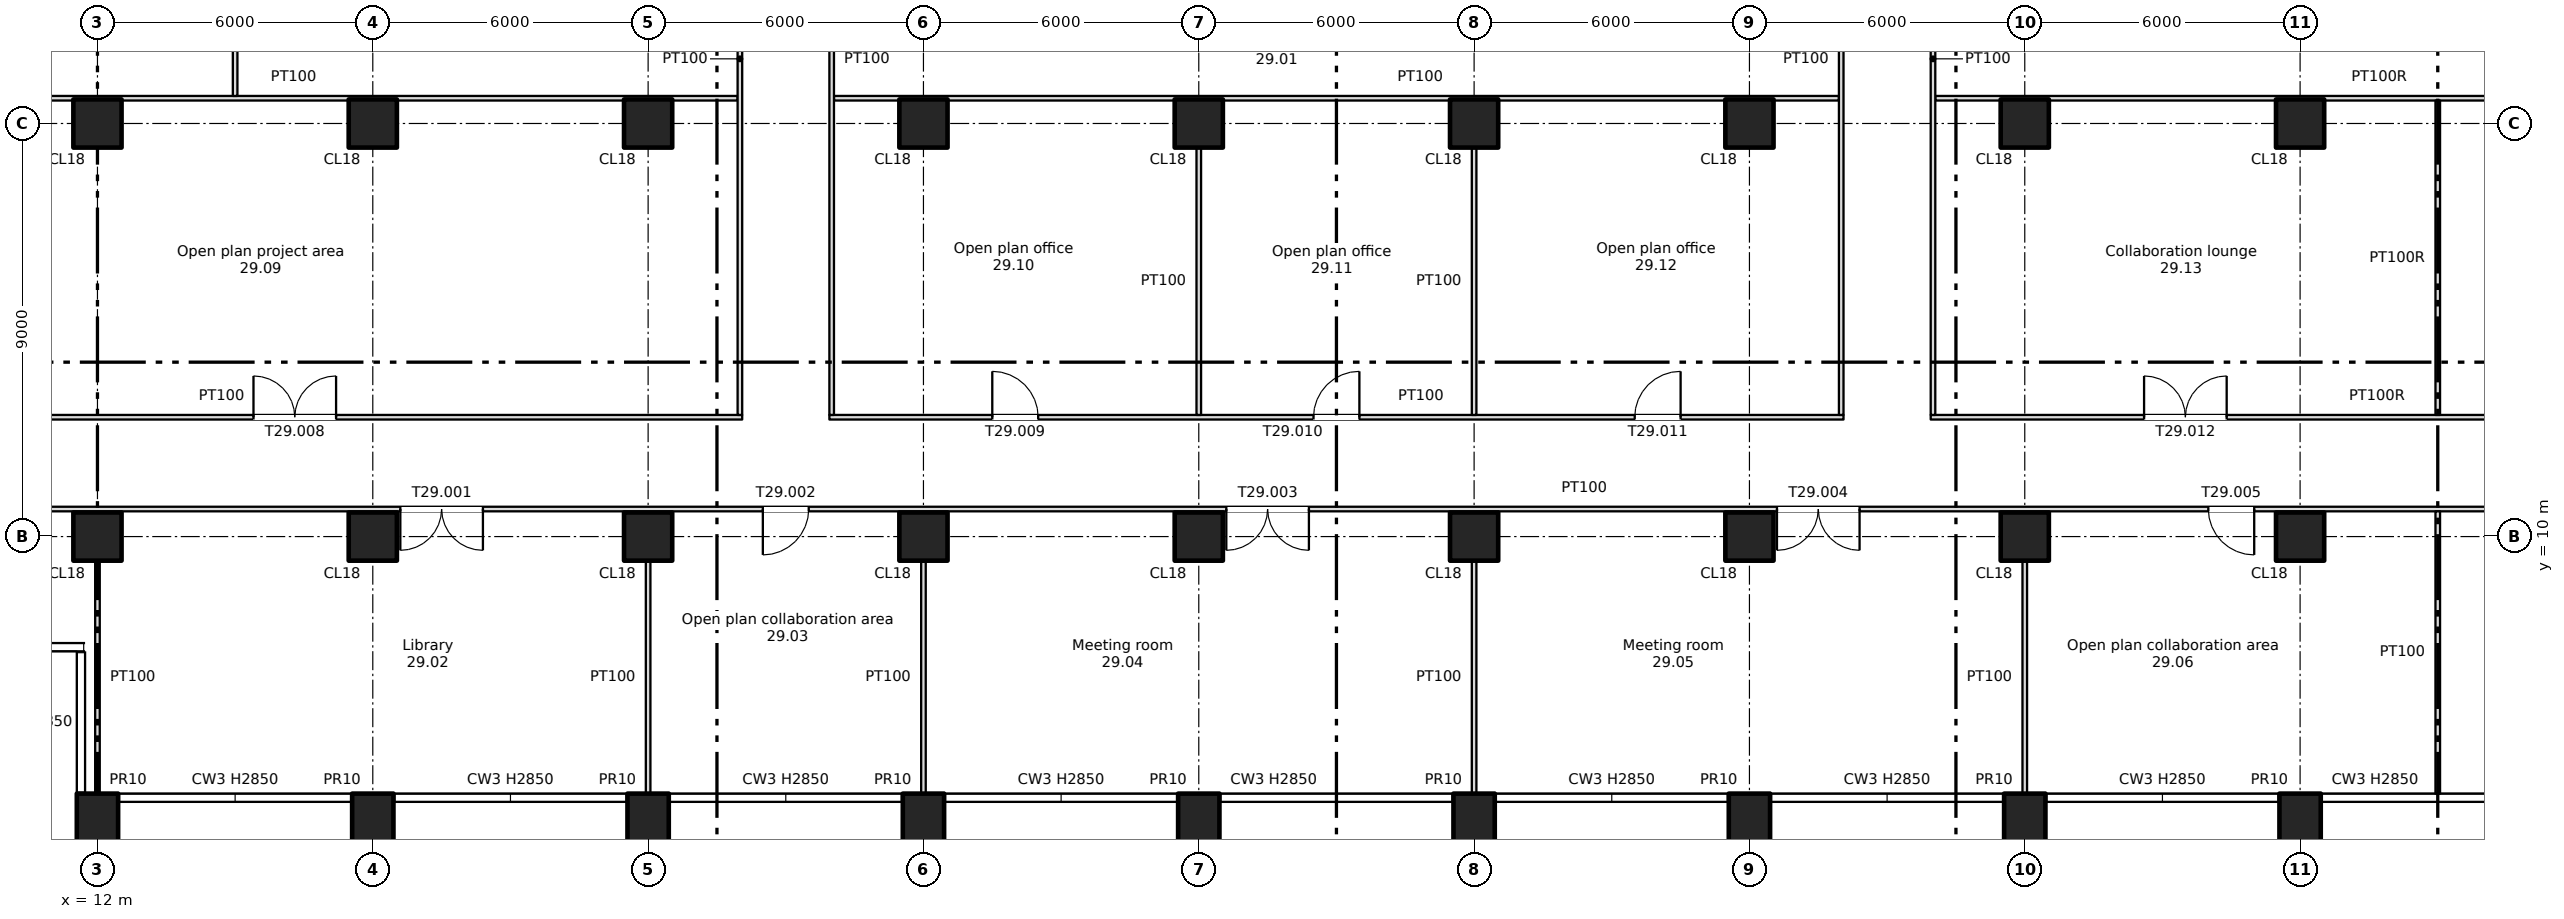
"""IFC4 building model, lengths in metres.
Left out: names, types, materials, properties, quantities, classifications, styles, units other than length and angle.
Written with IfcOpenShell. Run it as: python <this file> out.ifc"""

import sys

from ifc_helpers import new_model, si_unit, direction, frame, frame_2d, origin, origin_2d, place, context, subcontext, project, spatial, rectangle, extrude, element, fill, save


model = new_model("IFC4")
c1 = context("Model", 3, precision=1e-05, world=origin(), true_north=direction((0.0, 1.0)))
c2 = subcontext(c1, "Body", "Model", "MODEL_VIEW")
j1 = project(units=[si_unit("LENGTHUNIT", "METRE"), si_unit("PLANEANGLEUNIT", "RADIAN")], contexts=[c1])
p1 = place(None, origin())
s1 = spatial("IfcSite", under=j1, at=p1, CompositionType="ELEMENT")
p2 = place(p1, origin())
s2 = spatial("IfcBuilding", under=s1, at=p2, CompositionType="ELEMENT")
p3 = place(p2, frame((0.0, 0.0, 200.5)))
s3 = spatial("IfcBuildingStorey", under=s2, at=p3, CompositionType="ELEMENT", Elevation=200.5)
for number, where, z_axis, x_axis in (
    (1, (12.0, 3.7, -0.4), (0.0, 0.0, 1.0), (1.0, 0.0, 0.0)),
    (2, (18.0, 3.7, -0.4), (0.0, 0.0, 1.0), (1.0, 0.0, 0.0)),
    (3, (24.0, 3.7, -0.4), (0.0, 0.0, 1.0), (1.0, 0.0, 0.0)),
    (4, (30.0, 3.7, -0.4), (0.0, 0.0, 1.0), (1.0, 0.0, 0.0)),
    (5, (36.0, 3.7, -0.4), (0.0, 0.0, 1.0), (1.0, 0.0, 0.0)),
    (6, (42.0, 3.7, -0.4), (0.0, 0.0, 1.0), (1.0, 0.0, 0.0)),
    (7, (48.0, 3.7, -0.4), (0.0, 0.0, 1.0), (1.0, 0.0, 0.0)),
    (8, (54.0, 3.7, -0.4), (0.0, 0.0, 1.0), (1.0, 0.0, 0.0)),
    (9, (60.0, 3.7, -0.4), (0.0, 0.0, 1.0), (1.0, 0.0, 0.0)),
):
    element("IfcColumn", number, at=place(p3, frame(where, z_axis=z_axis, x_axis=x_axis)), inside=s3, PredefinedType="COLUMN", context=c2, shape_type="SweptSolid", body=[
        extrude(rectangle(XDim=0.9, YDim=1.4, at=origin_2d()), origin(), (0.0, 0.0, 1.0), 3.75),
    ])
for number, where, z_axis, x_axis in (
    (10, (12.0, 10.0, 0.0), (0.0, 0.0, 1.0), (1.0, 0.0, 0.0)),
    (11, (12.0, 19.0, 0.0), (0.0, 0.0, 1.0), (1.0, 0.0, 0.0)),
    (12, (18.0, 10.0, 0.0), (0.0, 0.0, 1.0), (1.0, 0.0, 0.0)),
    (13, (18.0, 19.0, 0.0), (0.0, 0.0, 1.0), (1.0, 0.0, 0.0)),
    (14, (24.0, 10.0, 0.0), (0.0, 0.0, 1.0), (1.0, 0.0, 0.0)),
    (15, (24.0, 19.0, 0.0), (0.0, 0.0, 1.0), (1.0, 0.0, 0.0)),
    (16, (30.0, 10.0, 0.0), (0.0, 0.0, 1.0), (1.0, 0.0, 0.0)),
    (17, (30.0, 19.0, 0.0), (0.0, 0.0, 1.0), (1.0, 0.0, 0.0)),
    (18, (36.0, 10.0, 0.0), (0.0, 0.0, 1.0), (1.0, 0.0, 0.0)),
    (19, (36.0, 19.0, 0.0), (0.0, 0.0, 1.0), (1.0, 0.0, 0.0)),
    (20, (42.0, 10.0, 0.0), (0.0, 0.0, 1.0), (1.0, 0.0, 0.0)),
    (21, (42.0, 19.0, 0.0), (0.0, 0.0, 1.0), (1.0, 0.0, 0.0)),
    (22, (48.0, 10.0, 0.0), (0.0, 0.0, 1.0), (1.0, 0.0, 0.0)),
    (23, (48.0, 19.0, 0.0), (0.0, 0.0, 1.0), (1.0, 0.0, 0.0)),
    (24, (54.0, 10.0, 0.0), (0.0, 0.0, 1.0), (1.0, 0.0, 0.0)),
    (25, (54.0, 19.0, 0.0), (0.0, 0.0, 1.0), (1.0, 0.0, 0.0)),
    (26, (60.0, 10.0, 0.0), (0.0, 0.0, 1.0), (1.0, 0.0, 0.0)),
    (27, (60.0, 19.0, 0.0), (0.0, 0.0, 1.0), (1.0, 0.0, 0.0)),
):
    element("IfcColumn", number, at=place(p3, frame(where, z_axis=z_axis, x_axis=x_axis)), inside=s3, PredefinedType="COLUMN", context=c2, shape_type="SweptSolid", body=[
        extrude(rectangle(XDim=1.05, YDim=1.05, at=origin_2d()), origin(), (0.0, 0.0, 1.0), 3.35),
    ])
p4 = place(p3, frame((6.6, 10.6, 0.0), z_axis=(0.0, 0.0, 1.0), x_axis=(1.0, 0.0, 0.0)))
e28 = element("IfcWall", 28, at=p4, inside=s3, PredefinedType="PARTITIONING", context=c2, shape_type="SweptSolid", body=[
    extrude(rectangle(XDim=64.8, YDim=0.1, at=frame_2d((32.4, 0.0))), origin(), (0.0, 0.0, 1.0), 3.35),
])
p5 = place(p4, frame((12.0, 0.0, 0.0)))
e29 = element("IfcOpeningElement", 29, at=p5, cuts=e28, PredefinedType="OPENING", context=c2, shape_type="SweptSolid", body=[
    extrude(rectangle(XDim=1.8, YDim=2.1, at=frame_2d((0.9, 1.05))), frame((0.0, 0.06, 0.0), z_axis=(0.0, -1.0, 0.0), x_axis=(1.0, 0.0, 0.0)), (0.0, 0.0, 1.0), 0.12),
])
p6 = place(p4, frame((19.9, 0.0, 0.0)))
e30 = element("IfcOpeningElement", 30, at=p6, cuts=e28, PredefinedType="OPENING", context=c2, shape_type="SweptSolid", body=[
    extrude(rectangle(XDim=1.0, YDim=2.1, at=frame_2d((0.5, 1.05))), frame((0.0, 0.06, 0.0), z_axis=(0.0, -1.0, 0.0), x_axis=(1.0, 0.0, 0.0)), (0.0, 0.0, 1.0), 0.12),
])
p7 = place(p4, frame((30.0, 0.0, 0.0)))
e31 = element("IfcOpeningElement", 31, at=p7, cuts=e28, PredefinedType="OPENING", context=c2, shape_type="SweptSolid", body=[
    extrude(rectangle(XDim=1.8, YDim=2.1, at=frame_2d((0.9, 1.05))), frame((0.0, 0.06, 0.0), z_axis=(0.0, -1.0, 0.0), x_axis=(1.0, 0.0, 0.0)), (0.0, 0.0, 1.0), 0.12),
])
p8 = place(p4, frame((42.0, 0.0, 0.0)))
e32 = element("IfcOpeningElement", 32, at=p8, cuts=e28, PredefinedType="OPENING", context=c2, shape_type="SweptSolid", body=[
    extrude(rectangle(XDim=1.8, YDim=2.1, at=frame_2d((0.9, 1.05))), frame((0.0, 0.06, 0.0), z_axis=(0.0, -1.0, 0.0), x_axis=(1.0, 0.0, 0.0)), (0.0, 0.0, 1.0), 0.12),
])
p9 = place(p4, frame((51.4, 0.0, 0.0)))
e33 = element("IfcOpeningElement", 33, at=p9, cuts=e28, PredefinedType="OPENING", context=c2, shape_type="SweptSolid", body=[
    extrude(rectangle(XDim=1.0, YDim=2.1, at=frame_2d((0.5, 1.05))), frame((0.0, 0.06, 0.0), z_axis=(0.0, -1.0, 0.0), x_axis=(1.0, 0.0, 0.0)), (0.0, 0.0, 1.0), 0.12),
])
p10 = place(p4, frame((60.1, 0.0, 0.0)))
e34 = element("IfcOpeningElement", 34, at=p10, cuts=e28, PredefinedType="OPENING", context=c2, shape_type="SweptSolid", body=[
    extrude(rectangle(XDim=1.0, YDim=2.1, at=frame_2d((0.5, 1.05))), frame((0.0, 0.06, 0.0), z_axis=(0.0, -1.0, 0.0), x_axis=(1.0, 0.0, 0.0)), (0.0, 0.0, 1.0), 0.12),
])
p11 = place(p4, frame((2.2, 0.0, 0.0)))
e35 = element("IfcOpeningElement", 35, at=p11, cuts=e28, PredefinedType="OPENING", context=c2, shape_type="SweptSolid", body=[
    extrude(rectangle(XDim=1.0, YDim=2.1, at=frame_2d((0.5, 1.05))), frame((0.0, 0.06, 0.0), z_axis=(0.0, -1.0, 0.0), x_axis=(1.0, 0.0, 0.0)), (0.0, 0.0, 1.0), 0.12),
])
p12 = place(p3, frame((6.6, 12.6, 0.0), z_axis=(0.0, 0.0, 1.0), x_axis=(1.0, 0.0, 0.0)))
e36 = element("IfcWall", 36, at=p12, inside=s3, PredefinedType="PARTITIONING", context=c2, shape_type="SweptSolid", body=[
    extrude(rectangle(XDim=19.45, YDim=0.1, at=frame_2d((9.725, 0.0))), origin(), (0.0, 0.0, 1.0), 3.35),
])
p13 = place(p12, frame((8.8, 0.0, 0.0)))
e37 = element("IfcOpeningElement", 37, at=p13, cuts=e36, PredefinedType="OPENING", context=c2, shape_type="SweptSolid", body=[
    extrude(rectangle(XDim=1.8, YDim=2.1, at=frame_2d((0.9, 1.05))), frame((0.0, 0.06, 0.0), z_axis=(0.0, -1.0, 0.0), x_axis=(1.0, 0.0, 0.0)), (0.0, 0.0, 1.0), 0.12),
])
p14 = place(p3, frame((27.95, 12.6, 0.0), z_axis=(0.0, 0.0, 1.0), x_axis=(1.0, 0.0, 0.0)))
e38 = element("IfcWall", 38, at=p14, inside=s3, PredefinedType="PARTITIONING", context=c2, shape_type="SweptSolid", body=[
    extrude(rectangle(XDim=22.1, YDim=0.1, at=frame_2d((11.05, 0.0))), origin(), (0.0, 0.0, 1.0), 3.35),
])
p15 = place(p14, frame((3.55, 0.0, 0.0)))
e39 = element("IfcOpeningElement", 39, at=p15, cuts=e38, PredefinedType="OPENING", context=c2, shape_type="SweptSolid", body=[
    extrude(rectangle(XDim=1.0, YDim=2.1, at=frame_2d((0.5, 1.05))), frame((0.0, 0.06, 0.0), z_axis=(0.0, -1.0, 0.0), x_axis=(1.0, 0.0, 0.0)), (0.0, 0.0, 1.0), 0.12),
])
p16 = place(p14, frame((10.55, 0.0, 0.0)))
e40 = element("IfcOpeningElement", 40, at=p16, cuts=e38, PredefinedType="OPENING", context=c2, shape_type="SweptSolid", body=[
    extrude(rectangle(XDim=1.0, YDim=2.1, at=frame_2d((0.5, 1.05))), frame((0.0, 0.06, 0.0), z_axis=(0.0, -1.0, 0.0), x_axis=(1.0, 0.0, 0.0)), (0.0, 0.0, 1.0), 0.12),
])
p17 = place(p14, frame((17.55, 0.0, 0.0)))
e41 = element("IfcOpeningElement", 41, at=p17, cuts=e38, PredefinedType="OPENING", context=c2, shape_type="SweptSolid", body=[
    extrude(rectangle(XDim=1.0, YDim=2.1, at=frame_2d((0.5, 1.05))), frame((0.0, 0.06, 0.0), z_axis=(0.0, -1.0, 0.0), x_axis=(1.0, 0.0, 0.0)), (0.0, 0.0, 1.0), 0.12),
])
p18 = place(p3, frame((51.95, 12.6, 0.0), z_axis=(0.0, 0.0, 1.0), x_axis=(1.0, 0.0, 0.0)))
e42 = element("IfcWall", 42, at=p18, inside=s3, PredefinedType="PARTITIONING", context=c2, shape_type="SweptSolid", body=[
    extrude(rectangle(XDim=19.45, YDim=0.1, at=frame_2d((9.725, 0.0))), origin(), (0.0, 0.0, 1.0), 3.35),
])
p19 = place(p18, frame((4.65, 0.0, 0.0)))
e43 = element("IfcOpeningElement", 43, at=p19, cuts=e42, PredefinedType="OPENING", context=c2, shape_type="SweptSolid", body=[
    extrude(rectangle(XDim=1.8, YDim=2.1, at=frame_2d((0.9, 1.05))), frame((0.0, 0.06, 0.0), z_axis=(0.0, -1.0, 0.0), x_axis=(1.0, 0.0, 0.0)), (0.0, 0.0, 1.0), 0.12),
])
p20 = place(p18, frame((14.75, 0.0, 0.0)))
e44 = element("IfcOpeningElement", 44, at=p20, cuts=e42, PredefinedType="OPENING", context=c2, shape_type="SweptSolid", body=[
    extrude(rectangle(XDim=1.0, YDim=2.1, at=frame_2d((0.5, 1.05))), frame((0.0, 0.06, 0.0), z_axis=(0.0, -1.0, 0.0), x_axis=(1.0, 0.0, 0.0)), (0.0, 0.0, 1.0), 0.12),
])
p21 = place(p3, frame((6.6, 19.55, 0.0), z_axis=(0.0, 0.0, 1.0), x_axis=(1.0, 0.0, 0.0)))
e45 = element("IfcWall", 45, at=p21, inside=s3, PredefinedType="PARTITIONING", context=c2, shape_type="SweptSolid", body=[
    extrude(rectangle(XDim=19.35, YDim=0.1, at=frame_2d((9.675, 0.0))), origin(), (0.0, 0.0, 1.0), 3.35),
])
p22 = place(p3, frame((28.05, 19.55, 0.0), z_axis=(0.0, 0.0, 1.0), x_axis=(1.0, 0.0, 0.0)))
e46 = element("IfcWall", 46, at=p22, inside=s3, PredefinedType="PARTITIONING", context=c2, shape_type="SweptSolid", body=[
    extrude(rectangle(XDim=21.9, YDim=0.1, at=frame_2d((10.95, 0.0))), origin(), (0.0, 0.0, 1.0), 3.35),
])
p23 = place(p3, frame((52.05, 19.55, 0.0), z_axis=(0.0, 0.0, 1.0), x_axis=(1.0, 0.0, 0.0)))
e47 = element("IfcWall", 47, at=p23, inside=s3, PredefinedType="PARTITIONING", context=c2, shape_type="SweptSolid", body=[
    extrude(rectangle(XDim=19.35, YDim=0.1, at=frame_2d((9.675, 0.0))), origin(), (0.0, 0.0, 1.0), 3.35),
])
p24 = place(p3, frame((12.0, 4.4, 0.0), z_axis=(0.0, 0.0, 1.0), x_axis=(0.0, 1.0, 0.0)))
e48 = element("IfcWall", 48, at=p24, inside=s3, PredefinedType="PARTITIONING", context=c2, shape_type="SweptSolid", body=[
    extrude(rectangle(XDim=5.075, YDim=0.1, at=frame_2d((2.538, 0.0))), origin(), (0.0, 0.0, 1.0), 3.35),
])
p25 = place(p3, frame((15.0, 19.6, 0.0), z_axis=(0.0, 0.0, 1.0), x_axis=(0.0, 1.0, 0.0)))
e49 = element("IfcWall", 49, at=p25, inside=s3, PredefinedType="PARTITIONING", context=c2, shape_type="SweptSolid", body=[
    extrude(rectangle(XDim=6.35, YDim=0.1, at=frame_2d((3.175, 0.0))), origin(), (0.0, 0.0, 1.0), 3.35),
])
p26 = place(p3, frame((24.0, 4.4, 0.0), z_axis=(0.0, 0.0, 1.0), x_axis=(0.0, 1.0, 0.0)))
e50 = element("IfcWall", 50, at=p26, inside=s3, PredefinedType="PARTITIONING", context=c2, shape_type="SweptSolid", body=[
    extrude(rectangle(XDim=5.075, YDim=0.1, at=frame_2d((2.538, 0.0))), origin(), (0.0, 0.0, 1.0), 3.35),
])
for number, where, z_axis, x_axis in (
    (51, (26.0, 12.65, 0.0), (0.0, 0.0, 1.0), (0.0, 1.0, 0.0)),
    (52, (28.0, 12.65, 0.0), (0.0, 0.0, 1.0), (0.0, 1.0, 0.0)),
):
    element("IfcWall", number, at=place(p3, frame(where, z_axis=z_axis, x_axis=x_axis)), inside=s3, PredefinedType="PARTITIONING", context=c2, shape_type="SweptSolid", body=[
        extrude(rectangle(XDim=13.3, YDim=0.1, at=frame_2d((6.65, 0.0))), origin(), (0.0, 0.0, 1.0), 3.35),
    ])
p27 = place(p3, frame((30.0, 4.4, 0.0), z_axis=(0.0, 0.0, 1.0), x_axis=(0.0, 1.0, 0.0)))
e53 = element("IfcWall", 53, at=p27, inside=s3, PredefinedType="PARTITIONING", context=c2, shape_type="SweptSolid", body=[
    extrude(rectangle(XDim=5.075, YDim=0.1, at=frame_2d((2.538, 0.0))), origin(), (0.0, 0.0, 1.0), 3.35),
])
p28 = place(p3, frame((36.0, 12.65, 0.0), z_axis=(0.0, 0.0, 1.0), x_axis=(0.0, 1.0, 0.0)))
e54 = element("IfcWall", 54, at=p28, inside=s3, PredefinedType="PARTITIONING", context=c2, shape_type="SweptSolid", body=[
    extrude(rectangle(XDim=5.825, YDim=0.1, at=frame_2d((2.913, 0.0))), origin(), (0.0, 0.0, 1.0), 3.35),
])
p29 = place(p3, frame((42.0, 4.4, 0.0), z_axis=(0.0, 0.0, 1.0), x_axis=(0.0, 1.0, 0.0)))
e55 = element("IfcWall", 55, at=p29, inside=s3, PredefinedType="PARTITIONING", context=c2, shape_type="SweptSolid", body=[
    extrude(rectangle(XDim=5.075, YDim=0.1, at=frame_2d((2.538, 0.0))), origin(), (0.0, 0.0, 1.0), 3.35),
])
p30 = place(p3, frame((42.0, 12.65, 0.0), z_axis=(0.0, 0.0, 1.0), x_axis=(0.0, 1.0, 0.0)))
e56 = element("IfcWall", 56, at=p30, inside=s3, PredefinedType="PARTITIONING", context=c2, shape_type="SweptSolid", body=[
    extrude(rectangle(XDim=5.825, YDim=0.1, at=frame_2d((2.913, 0.0))), origin(), (0.0, 0.0, 1.0), 3.35),
])
for number, where, z_axis, x_axis in (
    (57, (50.0, 12.65, 0.0), (0.0, 0.0, 1.0), (0.0, 1.0, 0.0)),
    (58, (52.0, 12.65, 0.0), (0.0, 0.0, 1.0), (0.0, 1.0, 0.0)),
):
    element("IfcWall", number, at=place(p3, frame(where, z_axis=z_axis, x_axis=x_axis)), inside=s3, PredefinedType="PARTITIONING", context=c2, shape_type="SweptSolid", body=[
        extrude(rectangle(XDim=13.3, YDim=0.1, at=frame_2d((6.65, 0.0))), origin(), (0.0, 0.0, 1.0), 3.35),
    ])
p31 = place(p3, frame((54.0, 4.4, 0.0), z_axis=(0.0, 0.0, 1.0), x_axis=(0.0, 1.0, 0.0)))
e59 = element("IfcWall", 59, at=p31, inside=s3, PredefinedType="PARTITIONING", context=c2, shape_type="SweptSolid", body=[
    extrude(rectangle(XDim=5.075, YDim=0.1, at=frame_2d((2.538, 0.0))), origin(), (0.0, 0.0, 1.0), 3.35),
])
p32 = place(p3, frame((63.0, 4.4, 0.0), z_axis=(0.0, 0.0, 1.0), x_axis=(0.0, 1.0, 0.0)))
e60 = element("IfcWall", 60, at=p32, inside=s3, PredefinedType="PARTITIONING", context=c2, shape_type="SweptSolid", body=[
    extrude(rectangle(XDim=6.15, YDim=0.1, at=frame_2d((3.075, 0.0))), origin(), (0.0, 0.0, 1.0), 3.35),
])
p33 = place(p3, frame((63.0, 12.65, 0.0), z_axis=(0.0, 0.0, 1.0), x_axis=(0.0, 1.0, 0.0)))
e61 = element("IfcWall", 61, at=p33, inside=s3, PredefinedType="PARTITIONING", context=c2, shape_type="SweptSolid", body=[
    extrude(rectangle(XDim=6.85, YDim=0.1, at=frame_2d((3.425, 0.0))), origin(), (0.0, 0.0, 1.0), 3.35),
])
p34 = place(p5, origin())
e62 = element("IfcDoor", 62, at=p34, inside=s3, OperationType="DOUBLE_DOOR_SINGLE_SWING", PredefinedType="DOOR", context=c2, shape_type="SweptSolid", body=[
    extrude(rectangle(XDim=1.8, YDim=2.1, at=frame_2d((0.9, 1.05))), frame((0.0, 0.025, 0.0), z_axis=(0.0, -1.0, 0.0), x_axis=(1.0, 0.0, 0.0)), (0.0, 0.0, 1.0), 0.05),
])
fill(e29, e62)
p35 = place(p6, origin())
e63 = element("IfcDoor", 63, at=p35, inside=s3, OperationType="SINGLE_SWING_LEFT", PredefinedType="DOOR", context=c2, shape_type="SweptSolid", body=[
    extrude(rectangle(XDim=1.0, YDim=2.1, at=frame_2d((0.5, 1.05))), frame((0.0, 0.025, 0.0), z_axis=(0.0, -1.0, 0.0), x_axis=(1.0, 0.0, 0.0)), (0.0, 0.0, 1.0), 0.05),
])
fill(e30, e63)
p36 = place(p7, origin())
e64 = element("IfcDoor", 64, at=p36, inside=s3, OperationType="DOUBLE_DOOR_SINGLE_SWING", PredefinedType="DOOR", context=c2, shape_type="SweptSolid", body=[
    extrude(rectangle(XDim=1.8, YDim=2.1, at=frame_2d((0.9, 1.05))), frame((0.0, 0.025, 0.0), z_axis=(0.0, -1.0, 0.0), x_axis=(1.0, 0.0, 0.0)), (0.0, 0.0, 1.0), 0.05),
])
fill(e31, e64)
p37 = place(p8, origin())
e65 = element("IfcDoor", 65, at=p37, inside=s3, OperationType="DOUBLE_DOOR_SINGLE_SWING", PredefinedType="DOOR", context=c2, shape_type="SweptSolid", body=[
    extrude(rectangle(XDim=1.8, YDim=2.1, at=frame_2d((0.9, 1.05))), frame((0.0, 0.025, 0.0), z_axis=(0.0, -1.0, 0.0), x_axis=(1.0, 0.0, 0.0)), (0.0, 0.0, 1.0), 0.05),
])
fill(e32, e65)
p38 = place(p9, origin())
e66 = element("IfcDoor", 66, at=p38, inside=s3, OperationType="SINGLE_SWING_RIGHT", PredefinedType="DOOR", context=c2, shape_type="SweptSolid", body=[
    extrude(rectangle(XDim=1.0, YDim=2.1, at=frame_2d((0.5, 1.05))), frame((0.0, 0.025, 0.0), z_axis=(0.0, -1.0, 0.0), x_axis=(1.0, 0.0, 0.0)), (0.0, 0.0, 1.0), 0.05),
])
fill(e33, e66)
p39 = place(p13, origin())
e67 = element("IfcDoor", 67, at=p39, inside=s3, OperationType="DOUBLE_DOOR_SINGLE_SWING", PredefinedType="DOOR", context=c2, shape_type="SweptSolid", body=[
    extrude(rectangle(XDim=1.8, YDim=2.1, at=frame_2d((0.9, 1.05))), frame((0.0, 0.025, 0.0), z_axis=(0.0, -1.0, 0.0), x_axis=(1.0, 0.0, 0.0)), (0.0, 0.0, 1.0), 0.05),
])
fill(e37, e67)
p40 = place(p15, origin())
e68 = element("IfcDoor", 68, at=p40, inside=s3, OperationType="SINGLE_SWING_LEFT", PredefinedType="DOOR", context=c2, shape_type="SweptSolid", body=[
    extrude(rectangle(XDim=1.0, YDim=2.1, at=frame_2d((0.5, 1.05))), frame((0.0, 0.025, 0.0), z_axis=(0.0, -1.0, 0.0), x_axis=(1.0, 0.0, 0.0)), (0.0, 0.0, 1.0), 0.05),
])
fill(e39, e68)
p41 = place(p16, origin())
e69 = element("IfcDoor", 69, at=p41, inside=s3, OperationType="SINGLE_SWING_RIGHT", PredefinedType="DOOR", context=c2, shape_type="SweptSolid", body=[
    extrude(rectangle(XDim=1.0, YDim=2.1, at=frame_2d((0.5, 1.05))), frame((0.0, 0.025, 0.0), z_axis=(0.0, -1.0, 0.0), x_axis=(1.0, 0.0, 0.0)), (0.0, 0.0, 1.0), 0.05),
])
fill(e40, e69)
p42 = place(p17, origin())
e70 = element("IfcDoor", 70, at=p42, inside=s3, OperationType="SINGLE_SWING_RIGHT", PredefinedType="DOOR", context=c2, shape_type="SweptSolid", body=[
    extrude(rectangle(XDim=1.0, YDim=2.1, at=frame_2d((0.5, 1.05))), frame((0.0, 0.025, 0.0), z_axis=(0.0, -1.0, 0.0), x_axis=(1.0, 0.0, 0.0)), (0.0, 0.0, 1.0), 0.05),
])
fill(e41, e70)
p43 = place(p19, origin())
e71 = element("IfcDoor", 71, at=p43, inside=s3, OperationType="DOUBLE_DOOR_SINGLE_SWING", PredefinedType="DOOR", context=c2, shape_type="SweptSolid", body=[
    extrude(rectangle(XDim=1.8, YDim=2.1, at=frame_2d((0.9, 1.05))), frame((0.0, 0.025, 0.0), z_axis=(0.0, -1.0, 0.0), x_axis=(1.0, 0.0, 0.0)), (0.0, 0.0, 1.0), 0.05),
])
fill(e43, e71)
save(model, sys.argv[1])
